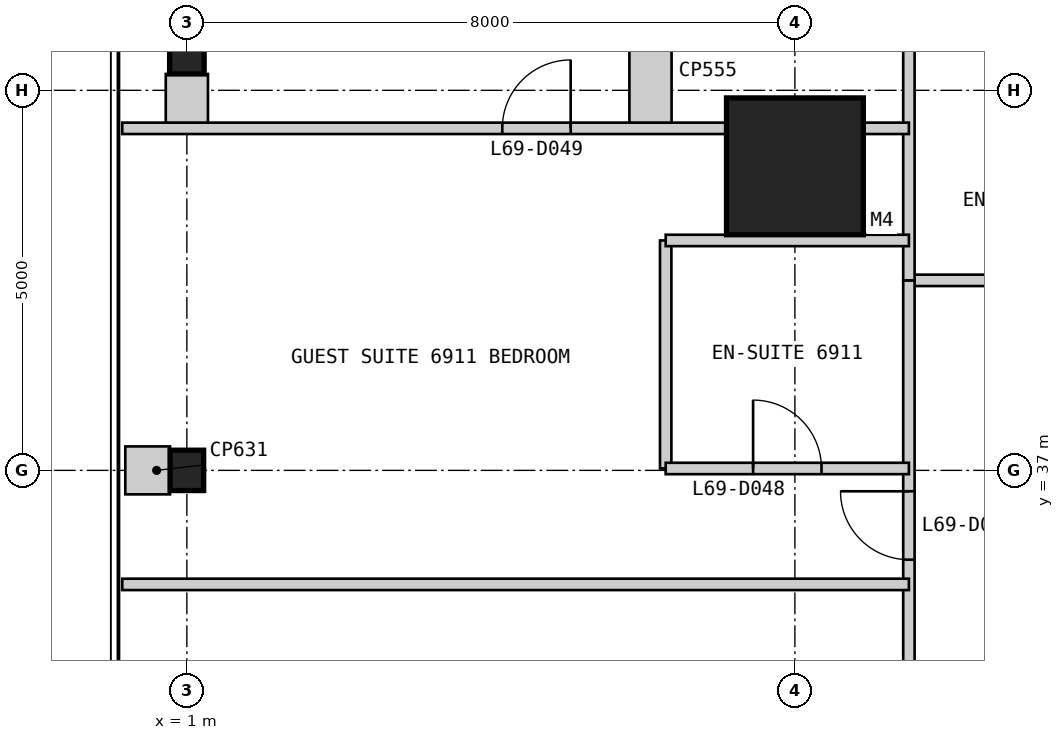
"""IFC4 building model, lengths in metres.
Left out: names, types, materials, properties, quantities, classifications, styles, units other than length and angle.
Written with IfcOpenShell. Run it as: python <this file> out.ifc"""

import sys

from ifc_helpers import new_model, si_unit, direction, frame, frame_2d, origin, origin_2d, place, context, subcontext, project, spatial, rectangle, i_section, extrude, element, fill, save


model = new_model("IFC4")
c1 = context("Model", 3, precision=1e-05, world=origin(), true_north=direction((0.0, 1.0)))
c2 = subcontext(c1, "Body", "Model", "MODEL_VIEW")
j1 = project(units=[si_unit("LENGTHUNIT", "METRE"), si_unit("PLANEANGLEUNIT", "RADIAN")], contexts=[c1])
p1 = place(None, origin())
s1 = spatial("IfcSite", under=j1, at=p1, CompositionType="ELEMENT")
p2 = place(p1, origin())
s2 = spatial("IfcBuilding", under=s1, at=p2, CompositionType="ELEMENT")
p3 = place(p2, frame((0.0, 0.0, 286.6)))
s3 = spatial("IfcBuildingStorey", under=s2, at=p3, CompositionType="ELEMENT", Elevation=286.6)
p4 = place(p3, frame((9.0, 41.0, 0.0), z_axis=(0.0, 0.0, 1.0), x_axis=(1.0, 0.0, 0.0)))
e1 = element("IfcColumn", 1, at=p4, inside=s3, PredefinedType="COLUMN", context=c2, shape_type="SweptSolid", body=[
    extrude(rectangle(XDim=1.8, YDim=1.8, at=origin_2d()), origin(), (0.0, 0.0, 1.0), 3.4),
])
p5 = place(p3, frame((1.0, 42.5, 0.0), z_axis=(0.0, 0.0, 1.0), x_axis=(1.0, 0.0, 0.0)))
e2 = element("IfcColumn", 2, at=p5, inside=s3, PredefinedType="COLUMN", context=c2, shape_type="SweptSolid", body=[
    extrude(i_section(OverallWidth=0.455, OverallDepth=0.569, WebThickness=0.078, FlangeThickness=0.125, at=origin_2d()), origin(), (0.0, 0.0, 1.0), 3.4),
])
p6 = place(p3, frame((1.0, 37.0, 0.0), z_axis=(0.0, 0.0, 1.0), x_axis=(1.0, 0.0, 0.0)))
e3 = element("IfcColumn", 3, at=p6, inside=s3, PredefinedType="COLUMN", context=c2, shape_type="SweptSolid", body=[
    extrude(i_section(OverallWidth=0.442, OverallDepth=0.531, WebThickness=0.066, FlangeThickness=0.106, at=origin_2d()), origin(), (0.0, 0.0, 1.0), 3.4),
])
p7 = place(p3, frame((39.5, 39.5, 0.0), z_axis=(0.0, 0.0, 1.0), x_axis=(-1.0, 0.0, 0.0)))
e4 = element("IfcWall", 4, at=p7, inside=s3, PredefinedType="PARTITIONING", context=c2, shape_type="SweptSolid", body=[
    extrude(rectangle(XDim=29.0, YDim=0.15, at=frame_2d((14.5, 0.0))), origin(), (0.0, 0.0, 1.0), 3.25),
])
p8 = place(p7, frame((1.85, 0.0, 0.0)))
e5 = element("IfcOpeningElement", 5, at=p8, cuts=e4, PredefinedType="OPENING", context=c2, shape_type="SweptSolid", body=[
    extrude(rectangle(XDim=0.9, YDim=2.1, at=frame_2d((0.45, 1.05))), frame((0.0, 0.085, 0.0), z_axis=(0.0, -1.0, 0.0), x_axis=(1.0, 0.0, 0.0)), (0.0, 0.0, 1.0), 0.17),
])
p9 = place(p7, frame((11.5, 0.0, 0.0)))
e6 = element("IfcOpeningElement", 6, at=p9, cuts=e4, PredefinedType="OPENING", context=c2, shape_type="SweptSolid", body=[
    extrude(rectangle(XDim=0.9, YDim=2.1, at=frame_2d((0.45, 1.05))), frame((0.0, 0.085, 0.0), z_axis=(0.0, -1.0, 0.0), x_axis=(1.0, 0.0, 0.0)), (0.0, 0.0, 1.0), 0.17),
])
p10 = place(p7, frame((24.1, 0.0, 0.0)))
e7 = element("IfcOpeningElement", 7, at=p10, cuts=e4, PredefinedType="OPENING", context=c2, shape_type="SweptSolid", body=[
    extrude(rectangle(XDim=0.9, YDim=2.1, at=frame_2d((0.45, 1.05))), frame((0.0, 0.085, 0.0), z_axis=(0.0, -1.0, 0.0), x_axis=(1.0, 0.0, 0.0)), (0.0, 0.0, 1.0), 0.17),
])
p11 = place(p3, frame((10.5, 39.5, 0.0), z_axis=(0.0, 0.0, 1.0), x_axis=(0.0, -1.0, 0.0)))
e8 = element("IfcWall", 8, at=p11, inside=s3, PredefinedType="PARTITIONING", context=c2, shape_type="SweptSolid", body=[
    extrude(rectangle(XDim=29.0, YDim=0.15, at=frame_2d((14.5, 0.0))), origin(), (0.0, 0.0, 1.0), 3.25),
])
p12 = place(p11, frame((2.775, 0.0, 0.0)))
e9 = element("IfcOpeningElement", 9, at=p12, cuts=e8, PredefinedType="OPENING", context=c2, shape_type="SweptSolid", body=[
    extrude(rectangle(XDim=0.9, YDim=2.1, at=frame_2d((0.45, 1.05))), frame((0.0, 0.085, 0.0), z_axis=(0.0, -1.0, 0.0), x_axis=(1.0, 0.0, 0.0)), (0.0, 0.0, 1.0), 0.17),
])
p13 = place(p11, frame((11.1, 0.0, 0.0)))
e10 = element("IfcOpeningElement", 10, at=p13, cuts=e8, PredefinedType="OPENING", context=c2, shape_type="SweptSolid", body=[
    extrude(rectangle(XDim=0.9, YDim=2.1, at=frame_2d((0.45, 1.05))), frame((0.0, 0.085, 0.0), z_axis=(0.0, -1.0, 0.0), x_axis=(1.0, 0.0, 0.0)), (0.0, 0.0, 1.0), 0.17),
])
p14 = place(p11, frame((17.5, 0.0, 0.0)))
e11 = element("IfcOpeningElement", 11, at=p14, cuts=e8, PredefinedType="OPENING", context=c2, shape_type="SweptSolid", body=[
    extrude(rectangle(XDim=0.9, YDim=2.1, at=frame_2d((0.45, 1.05))), frame((0.0, 0.085, 0.0), z_axis=(0.0, -1.0, 0.0), x_axis=(1.0, 0.0, 0.0)), (0.0, 0.0, 1.0), 0.17),
])
p15 = place(p11, frame((24.5, 0.0, 0.0)))
e12 = element("IfcOpeningElement", 12, at=p15, cuts=e8, PredefinedType="OPENING", context=c2, shape_type="SweptSolid", body=[
    extrude(rectangle(XDim=0.9, YDim=2.1, at=frame_2d((0.45, 1.05))), frame((0.0, 0.085, 0.0), z_axis=(0.0, -1.0, 0.0), x_axis=(1.0, 0.0, 0.0)), (0.0, 0.0, 1.0), 0.17),
])
p16 = place(p3, frame((10.5, 49.85, 0.0), z_axis=(0.0, 0.0, 1.0), x_axis=(0.0, -1.0, 0.0)))
e13 = element("IfcWall", 13, at=p16, inside=s3, PredefinedType="PARTITIONING", context=c2, shape_type="SweptSolid", body=[
    extrude(rectangle(XDim=10.35, YDim=0.15, at=frame_2d((5.175, 0.0))), origin(), (0.0, 0.0, 1.0), 3.25),
])
p17 = place(p3, frame((7.3, 40.025, 0.0), z_axis=(0.0, 0.0, 1.0), x_axis=(0.0, -1.0, 0.0)))
e14 = element("IfcWall", 14, at=p17, inside=s3, PredefinedType="PARTITIONING", context=c2, shape_type="SweptSolid", body=[
    extrude(rectangle(XDim=3.0, YDim=0.15, at=frame_2d((1.5, 0.0))), origin(), (0.0, 0.0, 1.0), 3.25),
])
p18 = place(p3, frame((7.3, 37.025, 0.0), z_axis=(0.0, 0.0, 1.0), x_axis=(1.0, 0.0, 0.0)))
e15 = element("IfcWall", 15, at=p18, inside=s3, PredefinedType="PARTITIONING", context=c2, shape_type="SweptSolid", body=[
    extrude(rectangle(XDim=3.2, YDim=0.15, at=frame_2d((1.6, 0.0))), origin(), (0.0, 0.0, 1.0), 2.404),
])
p19 = place(p18, frame((1.15, 0.0, 0.0)))
e16 = element("IfcOpeningElement", 16, at=p19, cuts=e15, PredefinedType="OPENING", context=c2, shape_type="SweptSolid", body=[
    extrude(rectangle(XDim=0.9, YDim=2.1, at=frame_2d((0.45, 1.05))), frame((0.0, 0.085, 0.0), z_axis=(0.0, -1.0, 0.0), x_axis=(1.0, 0.0, 0.0)), (0.0, 0.0, 1.0), 0.17),
])
p20 = place(p3, frame((7.3, 40.025, 0.0), z_axis=(0.0, 0.0, 1.0), x_axis=(1.0, 0.0, 0.0)))
e17 = element("IfcWall", 17, at=p20, inside=s3, PredefinedType="PARTITIONING", context=c2, shape_type="SweptSolid", body=[
    extrude(rectangle(XDim=3.2, YDim=0.15, at=frame_2d((1.6, 0.0))), origin(), (0.0, 0.0, 1.0), 3.25),
])
p21 = place(p3, frame((0.15, 41.5, 0.0), z_axis=(0.0, 0.0, 1.0), x_axis=(1.0, 0.0, 0.0)))
e18 = element("IfcWall", 18, at=p21, inside=s3, PredefinedType="PARTITIONING", context=c2, shape_type="SweptSolid", body=[
    extrude(rectangle(XDim=10.35, YDim=0.15, at=frame_2d((5.175, 0.0))), origin(), (0.0, 0.0, 1.0), 3.25),
])
p22 = place(p21, frame((5.0, 0.0, 0.0)))
e19 = element("IfcOpeningElement", 19, at=p22, cuts=e18, PredefinedType="OPENING", context=c2, shape_type="SweptSolid", body=[
    extrude(rectangle(XDim=0.9, YDim=2.1, at=frame_2d((0.45, 1.05))), frame((0.0, 0.085, 0.0), z_axis=(0.0, -1.0, 0.0), x_axis=(1.0, 0.0, 0.0)), (0.0, 0.0, 1.0), 0.17),
])
p23 = place(p3, frame((0.15, 35.5, 0.0), z_axis=(0.0, 0.0, 1.0), x_axis=(1.0, 0.0, 0.0)))
e20 = element("IfcWall", 20, at=p23, inside=s3, PredefinedType="PARTITIONING", context=c2, shape_type="SweptSolid", body=[
    extrude(rectangle(XDim=10.35, YDim=0.15, at=frame_2d((5.175, 0.0))), origin(), (0.0, 0.0, 1.0), 3.25),
])
p24 = place(p3, frame((7.1, 41.575, 0.0), z_axis=(0.0, 0.0, 1.0), x_axis=(0.0, 1.0, 0.0)))
e21 = element("IfcWall", 21, at=p24, inside=s3, PredefinedType="PARTITIONING", context=c2, shape_type="SweptSolid", body=[
    extrude(rectangle(XDim=1.041, YDim=0.555, at=frame_2d((0.52, 0.0))), origin(), (0.0, 0.0, 1.0), 3.25),
])
p25 = place(p3, frame((1.0, 41.575, 0.0), z_axis=(0.0, 0.0, 1.0), x_axis=(0.0, 1.0, 0.0)))
e22 = element("IfcWall", 22, at=p25, inside=s3, PredefinedType="PARTITIONING", context=c2, shape_type="SweptSolid", body=[
    extrude(rectangle(XDim=0.641, YDim=0.555, at=frame_2d((0.32, 0.0))), origin(), (0.0, 0.0, 1.0), 2.338),
])
p26 = place(p3, frame((0.19, 37.0, 0.0), z_axis=(0.0, 0.0, 1.0), x_axis=(1.0, 0.0, 0.0)))
e23 = element("IfcWall", 23, at=p26, inside=s3, PredefinedType="PARTITIONING", context=c2, shape_type="SweptSolid", body=[
    extrude(rectangle(XDim=0.589, YDim=0.631, at=frame_2d((0.294, 0.0))), origin(), (0.0, 0.0, 1.0), 3.25),
])
p27 = place(p19, origin())
e24 = element("IfcDoor", 24, at=p27, inside=s3, OperationType="SINGLE_SWING_LEFT", PredefinedType="DOOR", context=c2, shape_type="SweptSolid", body=[
    extrude(rectangle(XDim=0.9, YDim=2.1, at=frame_2d((0.45, 1.05))), frame((0.0, 0.025, 0.0), z_axis=(0.0, -1.0, 0.0), x_axis=(1.0, 0.0, 0.0)), (0.0, 0.0, 1.0), 0.05),
])
fill(e16, e24)
p28 = place(p22, origin())
e25 = element("IfcDoor", 25, at=p28, inside=s3, OperationType="SINGLE_SWING_RIGHT", PredefinedType="DOOR", context=c2, shape_type="SweptSolid", body=[
    extrude(rectangle(XDim=0.9, YDim=2.1, at=frame_2d((0.45, 1.05))), frame((0.0, 0.025, 0.0), z_axis=(0.0, -1.0, 0.0), x_axis=(1.0, 0.0, 0.0)), (0.0, 0.0, 1.0), 0.05),
])
fill(e19, e25)
p29 = place(p12, frame((0.9, 0.0, 0.0), z_axis=(0.0, 0.0, 1.0), x_axis=(-1.0, 0.0, 0.0)))
e26 = element("IfcDoor", 26, at=p29, inside=s3, OperationType="SINGLE_SWING_RIGHT", PredefinedType="DOOR", context=c2, shape_type="SweptSolid", body=[
    extrude(rectangle(XDim=0.9, YDim=2.1, at=frame_2d((0.45, 1.05))), frame((0.0, 0.025, 0.0), z_axis=(0.0, -1.0, 0.0), x_axis=(1.0, 0.0, 0.0)), (0.0, 0.0, 1.0), 0.05),
])
fill(e9, e26)
save(model, sys.argv[1])
